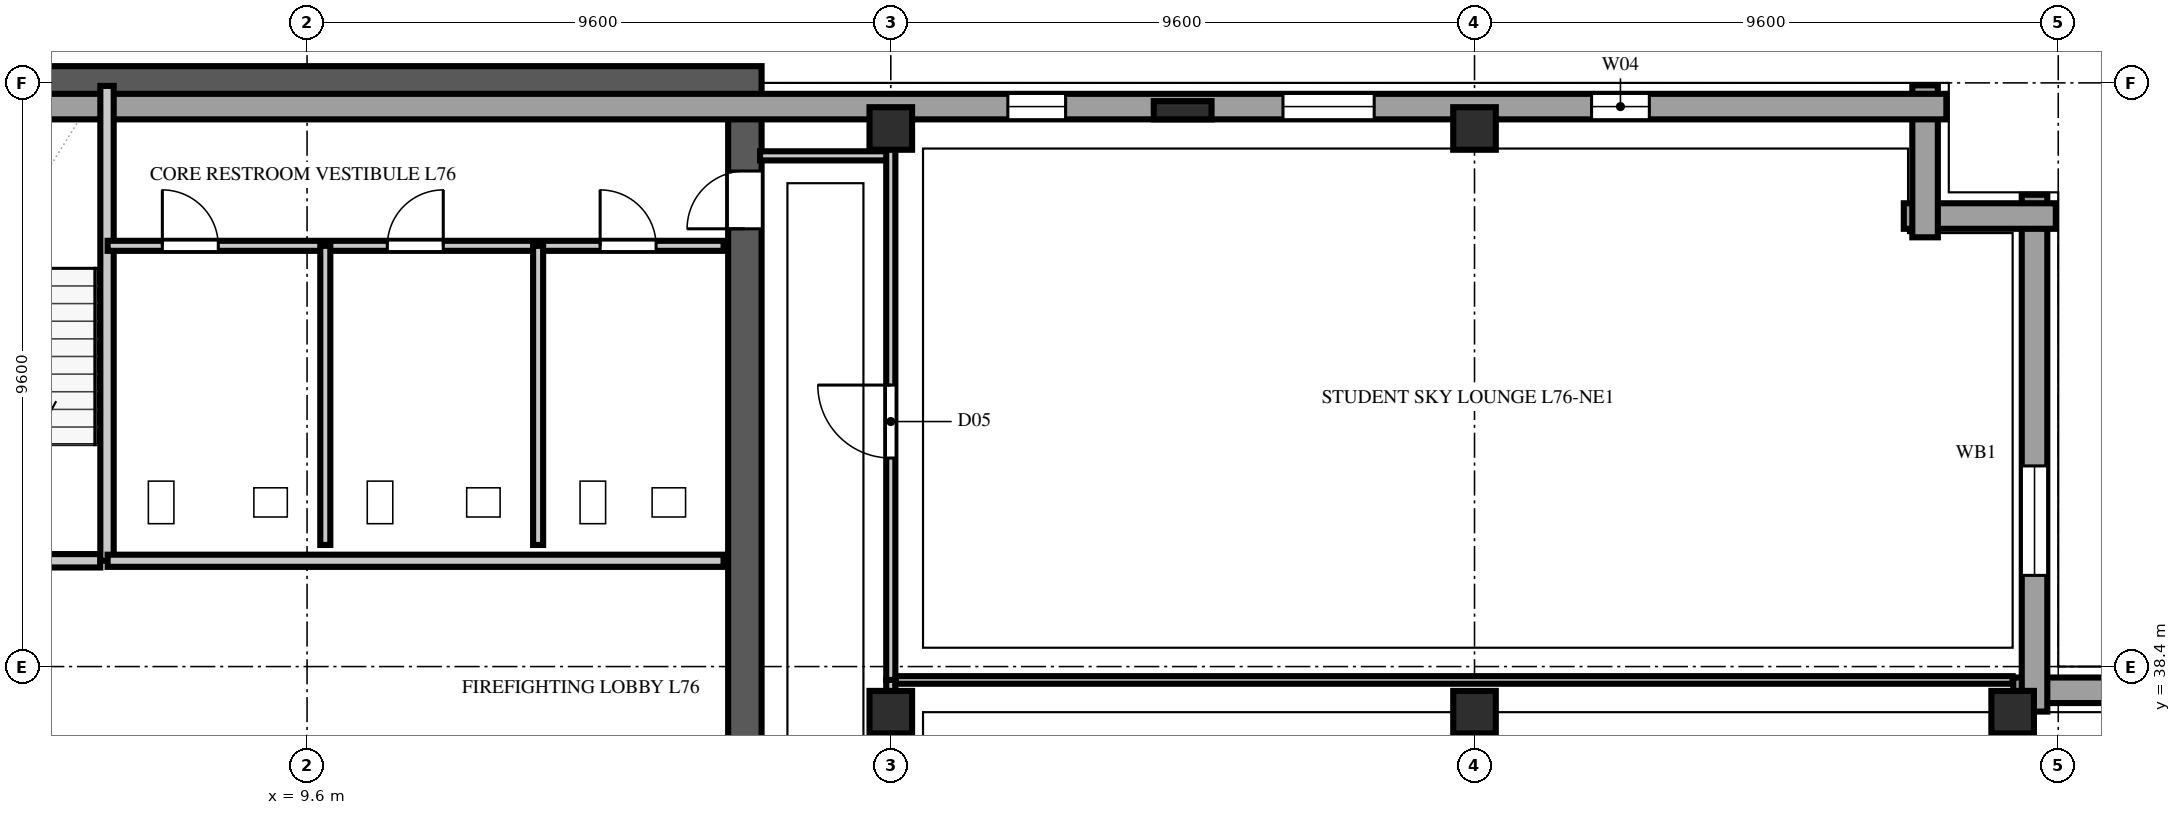
"""IFC4 building model, lengths in metres.
Left out: names, types, materials, properties, quantities, classifications, styles, units other than length and angle.
Written with IfcOpenShell. Run it as: python <this file> out.ifc"""

import sys

from ifc_helpers import new_model, si_unit, direction, frame, frame_2d, origin, origin_2d, place, context, subcontext, project, spatial, rectangle, extrude, element, fill, save


model = new_model("IFC4")
c1 = context("Model", 3, precision=1e-05, world=origin(), true_north=direction((0.0, 1.0)))
c2 = subcontext(c1, "Body", "Model", "MODEL_VIEW")
j1 = project(units=[si_unit("LENGTHUNIT", "METRE"), si_unit("PLANEANGLEUNIT", "RADIAN")], contexts=[c1])
p1 = place(None, origin())
s1 = spatial("IfcSite", under=j1, at=p1, CompositionType="ELEMENT")
p2 = place(p1, origin())
s2 = spatial("IfcBuilding", under=s1, at=p2, CompositionType="ELEMENT")
p3 = place(p2, frame((0.0, 0.0, 300.0)))
s3 = spatial("IfcBuildingStorey", under=s2, at=p3, CompositionType="ELEMENT", Elevation=300.0)
p4 = place(p3, frame((2.475, 48.0, 0.0), z_axis=(0.0, 0.0, 1.0), x_axis=(1.0, 0.0, 0.0)))
e1 = element("IfcWall", 1, at=p4, inside=s3, PredefinedType="SHEAR", context=c2, shape_type="SweptSolid", body=[
    extrude(rectangle(XDim=14.6, YDim=0.55, at=frame_2d((7.3, 0.0))), origin(), (0.0, 0.0, 1.0), 3.54),
])
p5 = place(p3, frame((16.8, 36.4, 0.0), z_axis=(0.0, 0.0, 1.0), x_axis=(0.0, 1.0, 0.0)))
e2 = element("IfcWall", 2, at=p5, inside=s3, PredefinedType="SHEAR", context=c2, shape_type="SweptSolid", body=[
    extrude(rectangle(XDim=11.325, YDim=0.55, at=frame_2d((5.663, 0.0))), origin(), (0.0, 0.0, 1.0), 3.54),
])
p6 = place(p5, frame((9.2, 0.0, 0.0)))
e3 = element("IfcOpeningElement", 3, at=p6, cuts=e2, PredefinedType="OPENING", context=c2, shape_type="SweptSolid", body=[
    extrude(rectangle(XDim=0.95, YDim=2.15, at=frame_2d((0.475, 1.075))), frame((0.0, 0.287, 0.0), z_axis=(0.0, -1.0, 0.0), x_axis=(1.0, 0.0, 0.0)), (0.0, 0.0, 1.0), 0.574),
])
for number, where, z_axis, x_axis in (
    (4, (19.2, 37.65, 0.0), (0.0, 0.0, 1.0), (1.0, 0.0, 0.0)),
    (5, (19.2, 47.25, 0.0), (0.0, 0.0, 1.0), (1.0, 0.0, 0.0)),
    (6, (28.8, 37.65, 0.0), (0.0, 0.0, 1.0), (1.0, 0.0, 0.0)),
    (7, (28.8, 47.25, 0.0), (0.0, 0.0, 1.0), (1.0, 0.0, 0.0)),
    (8, (37.65, 37.65, 0.0), (0.0, 0.0, 1.0), (1.0, 0.0, 0.0)),
):
    element("IfcColumn", number, at=place(p3, frame(where, z_axis=z_axis, x_axis=x_axis)), inside=s3, PredefinedType="COLUMN", context=c2, shape_type="SweptSolid", body=[
        extrude(rectangle(XDim=0.7, YDim=0.7, at=origin_2d()), origin(), (0.0, 0.0, 1.0), 3.8),
    ])
p7 = place(p3, frame((24.0, 47.55, 0.0), z_axis=(0.0, 0.0, 1.0), x_axis=(1.0, 0.0, 0.0)))
e9 = element("IfcColumn", 9, at=p7, inside=s3, PredefinedType="PILASTER", context=c2, shape_type="SweptSolid", body=[
    extrude(rectangle(XDim=0.95, YDim=0.3, at=origin_2d()), origin(), (0.0, 0.0, 1.0), 3.8),
])
p8 = place(p3, frame((46.16, 38.01, 0.0), z_axis=(0.0, 0.0, 1.0), x_axis=(-1.0, 0.0, 0.0)))
e10 = element("IfcWall", 10, at=p8, inside=s3, PredefinedType="SOLIDWALL", context=c2, shape_type="SweptSolid", body=[
    extrude(rectangle(XDim=8.5, YDim=0.42, at=frame_2d((4.25, 0.0))), origin(), (0.0, 0.0, 1.0), 3.54),
])
p9 = place(p8, frame((4.46, 0.0, 0.85)))
e11 = element("IfcOpeningElement", 11, at=p9, cuts=e10, PredefinedType="OPENING", context=c2, shape_type="SweptSolid", body=[
    extrude(rectangle(XDim=1.8, YDim=1.85, at=frame_2d((0.9, 0.925))), frame((0.0, 0.222, 0.0), z_axis=(0.0, -1.0, 0.0), x_axis=(1.0, 0.0, 0.0)), (0.0, 0.0, 1.0), 0.444),
])
p10 = place(p3, frame((38.01, 37.66, 0.0), z_axis=(0.0, 0.0, 1.0), x_axis=(0.0, 1.0, 0.0)))
e12 = element("IfcWall", 12, at=p10, inside=s3, PredefinedType="SOLIDWALL", context=c2, shape_type="SweptSolid", body=[
    extrude(rectangle(XDim=8.5, YDim=0.42, at=frame_2d((4.25, 0.0))), origin(), (0.0, 0.0, 1.0), 3.54),
])
p11 = place(p10, frame((2.24, 0.0, 0.85)))
e13 = element("IfcOpeningElement", 13, at=p11, cuts=e12, PredefinedType="OPENING", context=c2, shape_type="SweptSolid", body=[
    extrude(rectangle(XDim=1.8, YDim=1.85, at=frame_2d((0.9, 0.925))), frame((0.0, 0.222, 0.0), z_axis=(0.0, -1.0, 0.0), x_axis=(1.0, 0.0, 0.0)), (0.0, 0.0, 1.0), 0.444),
])
for number, where, z_axis, x_axis in (
    (14, (38.36, 45.81, 0.0), (0.0, 0.0, 1.0), (-1.0, 0.0, 0.0)),
    (15, (36.21, 45.46, 0.0), (0.0, 0.0, 1.0), (0.0, 1.0, 0.0)),
):
    element("IfcWall", number, at=place(p3, frame(where, z_axis=z_axis, x_axis=x_axis)), inside=s3, PredefinedType="SOLIDWALL", context=c2, shape_type="SweptSolid", body=[
        extrude(rectangle(XDim=2.5, YDim=0.42, at=frame_2d((1.25, 0.0))), origin(), (0.0, 0.0, 1.0), 3.54),
    ])
p12 = place(p3, frame((36.56, 47.61, 0.0), z_axis=(0.0, 0.0, 1.0), x_axis=(-1.0, 0.0, 0.0)))
e16 = element("IfcWall", 16, at=p12, inside=s3, PredefinedType="SOLIDWALL", context=c2, shape_type="SweptSolid", body=[
    extrude(rectangle(XDim=34.085, YDim=0.42, at=frame_2d((17.042, 0.0))), origin(), (0.0, 0.0, 1.0), 3.54),
])
p13 = place(p12, frame((4.885, 0.0, 0.9)))
e17 = element("IfcOpeningElement", 17, at=p13, cuts=e16, PredefinedType="OPENING", context=c2, shape_type="SweptSolid", body=[
    extrude(rectangle(XDim=0.95, YDim=1.85, at=frame_2d((0.475, 0.925))), frame((0.0, 0.222, 0.0), z_axis=(0.0, -1.0, 0.0), x_axis=(1.0, 0.0, 0.0)), (0.0, 0.0, 1.0), 0.444),
])
p14 = place(p12, frame((9.41, 0.0, 0.9)))
e18 = element("IfcOpeningElement", 18, at=p14, cuts=e16, PredefinedType="OPENING", context=c2, shape_type="SweptSolid", body=[
    extrude(rectangle(XDim=1.5, YDim=1.85, at=frame_2d((0.75, 0.925))), frame((0.0, 0.222, 0.0), z_axis=(0.0, -1.0, 0.0), x_axis=(1.0, 0.0, 0.0)), (0.0, 0.0, 1.0), 0.444),
])
p15 = place(p12, frame((14.485, 0.0, 0.9)))
e19 = element("IfcOpeningElement", 19, at=p15, cuts=e16, PredefinedType="OPENING", context=c2, shape_type="SweptSolid", body=[
    extrude(rectangle(XDim=0.95, YDim=1.85, at=frame_2d((0.475, 0.925))), frame((0.0, 0.222, 0.0), z_axis=(0.0, -1.0, 0.0), x_axis=(1.0, 0.0, 0.0)), (0.0, 0.0, 1.0), 0.444),
])
p16 = place(p3, frame((2.65, 40.14, 0.0), z_axis=(0.0, 0.0, 1.0), x_axis=(1.0, 0.0, 0.0)))
e20 = element("IfcWall", 20, at=p16, inside=s3, PredefinedType="SOLIDWALL", context=c2, shape_type="SweptSolid", body=[
    extrude(rectangle(XDim=3.55, YDim=0.22, at=frame_2d((1.775, 0.0))), origin(), (0.0, 0.0, 1.0), 3.54),
])
p17 = place(p16, frame((1.2, 0.0, 0.0)))
e21 = element("IfcOpeningElement", 21, at=p17, cuts=e20, PredefinedType="OPENING", context=c2, shape_type="SweptSolid", body=[
    extrude(rectangle(XDim=1.1, YDim=2.2, at=frame_2d((0.55, 1.1))), frame((0.0, 0.122, 0.0), z_axis=(0.0, -1.0, 0.0), x_axis=(1.0, 0.0, 0.0)), (0.0, 0.0, 1.0), 0.244),
])
p18 = place(p3, frame((6.31, 40.14, 0.0), z_axis=(0.0, 0.0, 1.0), x_axis=(0.0, 1.0, 0.0)))
e22 = element("IfcWall", 22, at=p18, inside=s3, PredefinedType="SOLIDWALL", context=c2, shape_type="SweptSolid", body=[
    extrude(rectangle(XDim=7.81, YDim=0.22, at=frame_2d((3.905, 0.0))), origin(), (0.0, 0.0, 1.0), 3.54),
])
p19 = place(p3, frame((6.32, 40.14, 0.0), z_axis=(0.0, 0.0, 1.0), x_axis=(1.0, 0.0, 0.0)))
e23 = element("IfcWall", 23, at=p19, inside=s3, PredefinedType="SOLIDWALL", context=c2, shape_type="SweptSolid", body=[
    extrude(rectangle(XDim=10.13, YDim=0.2, at=frame_2d((5.065, 0.0))), origin(), (0.0, 0.0, 1.0), 3.54),
])
p20 = place(p3, frame((6.32, 45.32, 0.0), z_axis=(0.0, 0.0, 1.0), x_axis=(1.0, 0.0, 0.0)))
e24 = element("IfcWall", 24, at=p20, inside=s3, PredefinedType="PLUMBINGWALL", context=c2, shape_type="SweptSolid", body=[
    extrude(rectangle(XDim=10.13, YDim=0.165, at=frame_2d((5.065, 0.0))), origin(), (0.0, 0.0, 1.0), 3.54),
])
p21 = place(p20, frame((0.9, 0.0, 0.0)))
e25 = element("IfcOpeningElement", 25, at=p21, cuts=e24, PredefinedType="OPENING", context=c2, shape_type="SweptSolid", body=[
    extrude(rectangle(XDim=0.92, YDim=2.15, at=frame_2d((0.46, 1.075))), frame((0.0, 0.094, 0.0), z_axis=(0.0, -1.0, 0.0), x_axis=(1.0, 0.0, 0.0)), (0.0, 0.0, 1.0), 0.189),
])
p22 = place(p20, frame((4.6, 0.0, 0.0)))
e26 = element("IfcOpeningElement", 26, at=p22, cuts=e24, PredefinedType="OPENING", context=c2, shape_type="SweptSolid", body=[
    extrude(rectangle(XDim=0.92, YDim=2.15, at=frame_2d((0.46, 1.075))), frame((0.0, 0.094, 0.0), z_axis=(0.0, -1.0, 0.0), x_axis=(1.0, 0.0, 0.0)), (0.0, 0.0, 1.0), 0.189),
])
p23 = place(p20, frame((8.1, 0.0, 0.0)))
e27 = element("IfcOpeningElement", 27, at=p23, cuts=e24, PredefinedType="OPENING", context=c2, shape_type="SweptSolid", body=[
    extrude(rectangle(XDim=0.92, YDim=2.15, at=frame_2d((0.46, 1.075))), frame((0.0, 0.094, 0.0), z_axis=(0.0, -1.0, 0.0), x_axis=(1.0, 0.0, 0.0)), (0.0, 0.0, 1.0), 0.189),
])
for number, where, z_axis, x_axis in (
    (28, (9.9, 40.4, 0.0), (0.0, 0.0, 1.0), (0.0, 1.0, 0.0)),
    (29, (13.4, 40.4, 0.0), (0.0, 0.0, 1.0), (0.0, 1.0, 0.0)),
):
    element("IfcWall", number, at=place(p3, frame(where, z_axis=z_axis, x_axis=x_axis)), inside=s3, PredefinedType="PLUMBINGWALL", context=c2, shape_type="SweptSolid", body=[
        extrude(rectangle(XDim=4.92, YDim=0.165, at=frame_2d((2.46, 0.0))), origin(), (0.0, 0.0, 1.0), 3.54),
    ])
p24 = place(p3, frame((17.05, 46.8, 0.0), z_axis=(0.0, 0.0, 1.0), x_axis=(1.0, 0.0, 0.0)))
e30 = element("IfcWall", 30, at=p24, inside=s3, PredefinedType="PARTITIONING", context=c2, shape_type="SweptSolid", body=[
    extrude(rectangle(XDim=2.15, YDim=0.15, at=frame_2d((1.075, 0.0))), origin(), (0.0, 0.0, 1.0), 3.54),
])
p25 = place(p3, frame((19.2, 33.3, 0.0), z_axis=(0.0, 0.0, 1.0), x_axis=(0.0, 1.0, 0.0)))
e31 = element("IfcWall", 31, at=p25, inside=s3, PredefinedType="PARTITIONING", context=c2, shape_type="SweptSolid", body=[
    extrude(rectangle(XDim=4.88, YDim=0.15, at=frame_2d((2.44, 0.0))), origin(), (0.0, 0.0, 1.0), 3.232),
])
p26 = place(p3, frame((19.28, 38.18, 0.0), z_axis=(0.0, 0.0, 1.0), x_axis=(1.0, 0.0, 0.0)))
e32 = element("IfcWall", 32, at=p26, inside=s3, PredefinedType="PARTITIONING", context=c2, shape_type="SweptSolid", body=[
    extrude(rectangle(XDim=18.37, YDim=0.125, at=frame_2d((9.185, 0.0))), origin(), (0.0, 0.0, 1.0), 3.54),
])
p27 = place(p3, frame((19.2, 38.18, 0.0), z_axis=(0.0, 0.0, 1.0), x_axis=(0.0, 1.0, 0.0)))
e33 = element("IfcWall", 33, at=p27, inside=s3, PredefinedType="PARTITIONING", context=c2, shape_type="SweptSolid", body=[
    extrude(rectangle(XDim=9.27, YDim=0.15, at=frame_2d((4.635, 0.0))), origin(), (0.0, 0.0, 1.0), 3.232),
])
p28 = place(p27, frame((3.65, 0.0, 0.0)))
e34 = element("IfcOpeningElement", 34, at=p28, cuts=e33, PredefinedType="OPENING", context=c2, shape_type="SweptSolid", body=[
    extrude(rectangle(XDim=1.2, YDim=2.2, at=frame_2d((0.6, 1.1))), frame((0.0, 0.087, 0.0), z_axis=(0.0, -1.0, 0.0), x_axis=(1.0, 0.0, 0.0)), (0.0, 0.0, 1.0), 0.174),
])
p29 = place(p11, origin())
e35 = element("IfcWindow", 35, at=p29, inside=s3, PartitioningType="DOUBLE_PANEL_VERTICAL", PredefinedType="WINDOW", context=c2, shape_type="SweptSolid", body=[
    extrude(rectangle(XDim=1.8, YDim=1.85, at=frame_2d((0.9, 0.925))), frame((0.0, 0.11, 0.0), z_axis=(0.0, -1.0, 0.0), x_axis=(1.0, 0.0, 0.0)), (0.0, 0.0, 1.0), 0.06),
])
fill(e13, e35)
p30 = place(p13, origin())
e36 = element("IfcWindow", 36, at=p30, inside=s3, PartitioningType="SINGLE_PANEL", PredefinedType="WINDOW", context=c2, shape_type="SweptSolid", body=[
    extrude(rectangle(XDim=0.95, YDim=1.85, at=frame_2d((0.475, 0.925))), frame((0.0, 0.11, 0.0), z_axis=(0.0, -1.0, 0.0), x_axis=(1.0, 0.0, 0.0)), (0.0, 0.0, 1.0), 0.06),
])
fill(e17, e36)
p31 = place(p14, origin())
e37 = element("IfcWindow", 37, at=p31, inside=s3, PartitioningType="DOUBLE_PANEL_VERTICAL", PredefinedType="WINDOW", context=c2, shape_type="SweptSolid", body=[
    extrude(rectangle(XDim=1.5, YDim=1.85, at=frame_2d((0.75, 0.925))), frame((0.0, 0.11, 0.0), z_axis=(0.0, -1.0, 0.0), x_axis=(1.0, 0.0, 0.0)), (0.0, 0.0, 1.0), 0.06),
])
fill(e18, e37)
p32 = place(p15, origin())
e38 = element("IfcWindow", 38, at=p32, inside=s3, PartitioningType="SINGLE_PANEL", PredefinedType="WINDOW", context=c2, shape_type="SweptSolid", body=[
    extrude(rectangle(XDim=0.95, YDim=1.85, at=frame_2d((0.475, 0.925))), frame((0.0, 0.11, 0.0), z_axis=(0.0, -1.0, 0.0), x_axis=(1.0, 0.0, 0.0)), (0.0, 0.0, 1.0), 0.06),
])
fill(e19, e38)
p33 = place(p6, origin())
e39 = element("IfcDoor", 39, at=p33, inside=s3, OperationType="SINGLE_SWING_LEFT", PredefinedType="DOOR", context=c2, shape_type="SweptSolid", body=[
    extrude(rectangle(XDim=0.95, YDim=2.15, at=frame_2d((0.475, 1.075))), frame((0.0, 0.025, 0.0), z_axis=(0.0, -1.0, 0.0), x_axis=(1.0, 0.0, 0.0)), (0.0, 0.0, 1.0), 0.05),
])
fill(e3, e39)
p34 = place(p21, origin())
e40 = element("IfcDoor", 40, at=p34, inside=s3, OperationType="SINGLE_SWING_LEFT", PredefinedType="DOOR", context=c2, shape_type="SweptSolid", body=[
    extrude(rectangle(XDim=0.92, YDim=2.15, at=frame_2d((0.46, 1.075))), frame((0.0, 0.025, 0.0), z_axis=(0.0, -1.0, 0.0), x_axis=(1.0, 0.0, 0.0)), (0.0, 0.0, 1.0), 0.05),
])
fill(e25, e40)
p35 = place(p22, origin())
e41 = element("IfcDoor", 41, at=p35, inside=s3, OperationType="SINGLE_SWING_RIGHT", PredefinedType="DOOR", context=c2, shape_type="SweptSolid", body=[
    extrude(rectangle(XDim=0.92, YDim=2.15, at=frame_2d((0.46, 1.075))), frame((0.0, 0.025, 0.0), z_axis=(0.0, -1.0, 0.0), x_axis=(1.0, 0.0, 0.0)), (0.0, 0.0, 1.0), 0.05),
])
fill(e26, e41)
p36 = place(p23, origin())
e42 = element("IfcDoor", 42, at=p36, inside=s3, OperationType="SINGLE_SWING_LEFT", PredefinedType="DOOR", context=c2, shape_type="SweptSolid", body=[
    extrude(rectangle(XDim=0.92, YDim=2.15, at=frame_2d((0.46, 1.075))), frame((0.0, 0.025, 0.0), z_axis=(0.0, -1.0, 0.0), x_axis=(1.0, 0.0, 0.0)), (0.0, 0.0, 1.0), 0.05),
])
fill(e27, e42)
p37 = place(p28, origin())
e43 = element("IfcDoor", 43, at=p37, inside=s3, OperationType="SINGLE_SWING_RIGHT", PredefinedType="DOOR", context=c2, shape_type="SweptSolid", body=[
    extrude(rectangle(XDim=1.2, YDim=2.2, at=frame_2d((0.6, 1.1))), frame((0.0, 0.025, 0.0), z_axis=(0.0, -1.0, 0.0), x_axis=(1.0, 0.0, 0.0)), (0.0, 0.0, 1.0), 0.05),
])
fill(e34, e43)
save(model, sys.argv[1])
